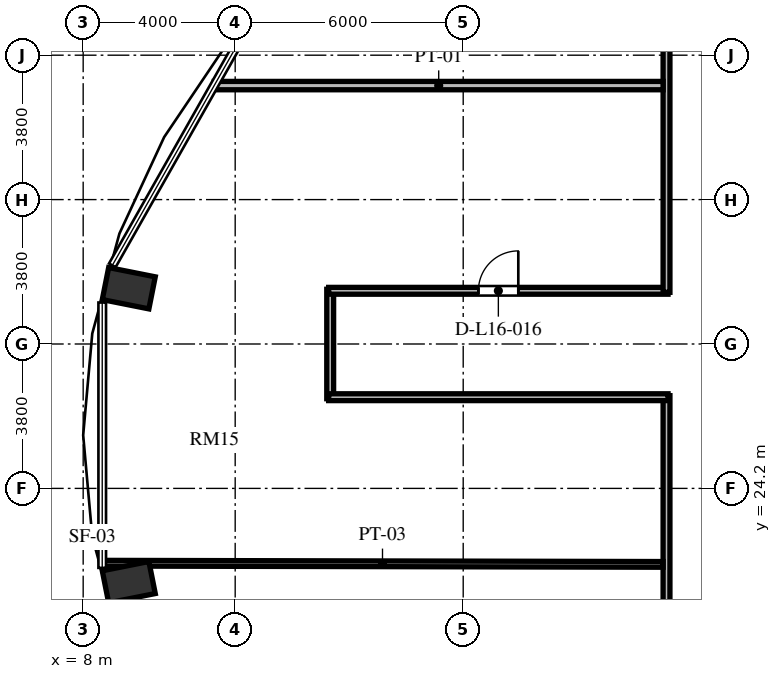
"""IFC4 building model, lengths in metres.
Left out: names, types, materials, properties, quantities, classifications, styles, units other than length and angle.
Written with IfcOpenShell. Run it as: python <this file> out.ifc"""

import sys

from ifc_helpers import new_model, si_unit, direction, frame, frame_2d, origin, origin_2d, place, context, subcontext, project, spatial, rectangle, extrude, element, fill, save


model = new_model("IFC4")
c1 = context("Model", 3, precision=1e-05, world=origin(), true_north=direction((0.0, 1.0)))
c2 = subcontext(c1, "Body", "Model", "MODEL_VIEW")
j1 = project(units=[si_unit("LENGTHUNIT", "METRE"), si_unit("PLANEANGLEUNIT", "RADIAN")], contexts=[c1])
p1 = place(None, origin())
s1 = spatial("IfcSite", under=j1, at=p1, CompositionType="ELEMENT")
p2 = place(p1, origin())
s2 = spatial("IfcBuilding", under=s1, at=p2, CompositionType="ELEMENT")
p3 = place(p2, frame((0.0, 0.0, 65.328)))
s3 = spatial("IfcBuildingStorey", under=s2, at=p3, CompositionType="ELEMENT", Elevation=65.328)
for number, where, z_axis, x_axis in (
    (1, (9.2, 29.468, 0.0), (0.0, 0.0, 1.0), (-0.981, 0.195, 0.0)),
    (2, (9.2, 21.732, 0.0), (0.0, 0.0, 1.0), (-0.981, -0.195, 0.0)),
):
    element("IfcColumn", number, at=place(p3, frame(where, z_axis=z_axis, x_axis=x_axis)), inside=s3, PredefinedType="COLUMN", context=c2, shape_type="SweptSolid", body=[
        extrude(rectangle(XDim=1.25, YDim=0.86, at=origin_2d()), origin(), (0.0, 0.0, 1.0), 3.648),
    ])
p4 = place(p3, frame((14.5, 26.56, 0.0), z_axis=(0.0, 0.0, 1.0), x_axis=(0.0, 1.0, 0.0)))
e3 = element("IfcWall", 3, at=p4, inside=s3, PredefinedType="PARTITIONING", context=c2, shape_type="SweptSolid", body=[
    extrude(rectangle(XDim=2.88, YDim=0.18, at=frame_2d((1.44, 0.0))), origin(), (0.0, 0.0, 1.0), 3.428),
])
p5 = place(p3, frame((14.46, 29.4, 0.0), z_axis=(0.0, 0.0, 1.0), x_axis=(1.0, 0.0, 0.0)))
e4 = element("IfcWall", 4, at=p5, inside=s3, PredefinedType="PARTITIONING", context=c2, shape_type="SweptSolid", body=[
    extrude(rectangle(XDim=8.93, YDim=0.18, at=frame_2d((4.465, 0.0))), origin(), (0.0, 0.0, 1.0), 3.428),
])
p6 = place(p5, frame((3.94, 0.0, 0.0)))
e5 = element("IfcOpeningElement", 5, at=p6, cuts=e4, PredefinedType="OPENING", context=c2, shape_type="SweptSolid", body=[
    extrude(rectangle(XDim=1.05, YDim=2.15, at=frame_2d((0.525, 1.075))), frame((0.0, 0.1, 0.0), z_axis=(0.0, -1.0, 0.0), x_axis=(1.0, 0.0, 0.0)), (0.0, 0.0, 1.0), 0.2),
])
p7 = place(p3, frame((23.35, 29.36, 0.0), z_axis=(0.0, 0.0, 1.0), x_axis=(0.0, 1.0, 0.0)))
e6 = element("IfcWall", 6, at=p7, inside=s3, PredefinedType="PARTITIONING", context=c2, shape_type="SweptSolid", body=[
    extrude(rectangle(XDim=9.43, YDim=0.18, at=frame_2d((4.715, 0.0))), origin(), (0.0, 0.0, 1.0), 3.428),
])
p8 = place(p3, frame((23.35, 17.36, 0.0), z_axis=(0.0, 0.0, 1.0), x_axis=(0.0, 1.0, 0.0)))
e7 = element("IfcWall", 7, at=p8, inside=s3, PredefinedType="PARTITIONING", context=c2, shape_type="SweptSolid", body=[
    extrude(rectangle(XDim=9.28, YDim=0.18, at=frame_2d((4.64, 0.0))), origin(), (0.0, 0.0, 1.0), 3.428),
])
p9 = place(p3, frame((23.39, 26.6, 0.0), z_axis=(0.0, 0.0, 1.0), x_axis=(-1.0, 0.0, 0.0)))
e8 = element("IfcWall", 8, at=p9, inside=s3, PredefinedType="PARTITIONING", context=c2, shape_type="SweptSolid", body=[
    extrude(rectangle(XDim=8.93, YDim=0.18, at=frame_2d((4.465, 0.0))), origin(), (0.0, 0.0, 1.0), 3.428),
])
p10 = place(p3, frame((8.493, 22.231, 0.0), z_axis=(0.0, 0.0, 1.0), x_axis=(0.999997760873, -0.002116187438, 0.0)))
e9 = element("IfcWall", 9, at=p10, inside=s3, PredefinedType="PARTITIONING", context=c2, shape_type="SweptSolid", body=[
    extrude(rectangle(XDim=14.767, YDim=0.15, at=frame_2d((7.384, 0.0))), origin(), (0.0, 0.0, 1.0), 3.428),
])
p11 = place(p3, frame((11.451, 34.8, 0.0), z_axis=(0.0, 0.0, 1.0), x_axis=(1.0, 0.0, 0.0)))
e10 = element("IfcWall", 10, at=p11, inside=s3, PredefinedType="PARTITIONING", context=c2, shape_type="SweptSolid", body=[
    extrude(rectangle(XDim=11.809, YDim=0.22, at=frame_2d((5.905, 0.0))), origin(), (0.0, 0.0, 1.0), 3.428),
])
p12 = place(p6, origin())
e11 = element("IfcDoor", 11, at=p12, inside=s3, OperationType="SINGLE_SWING_RIGHT", PredefinedType="DOOR", context=c2, shape_type="SweptSolid", body=[
    extrude(rectangle(XDim=1.05, YDim=2.15, at=frame_2d((0.525, 1.075))), frame((0.0, 0.025, 0.0), z_axis=(0.0, -1.0, 0.0), x_axis=(1.0, 0.0, 0.0)), (0.0, 0.0, 1.0), 0.05),
])
fill(e5, e11)
save(model, sys.argv[1])
